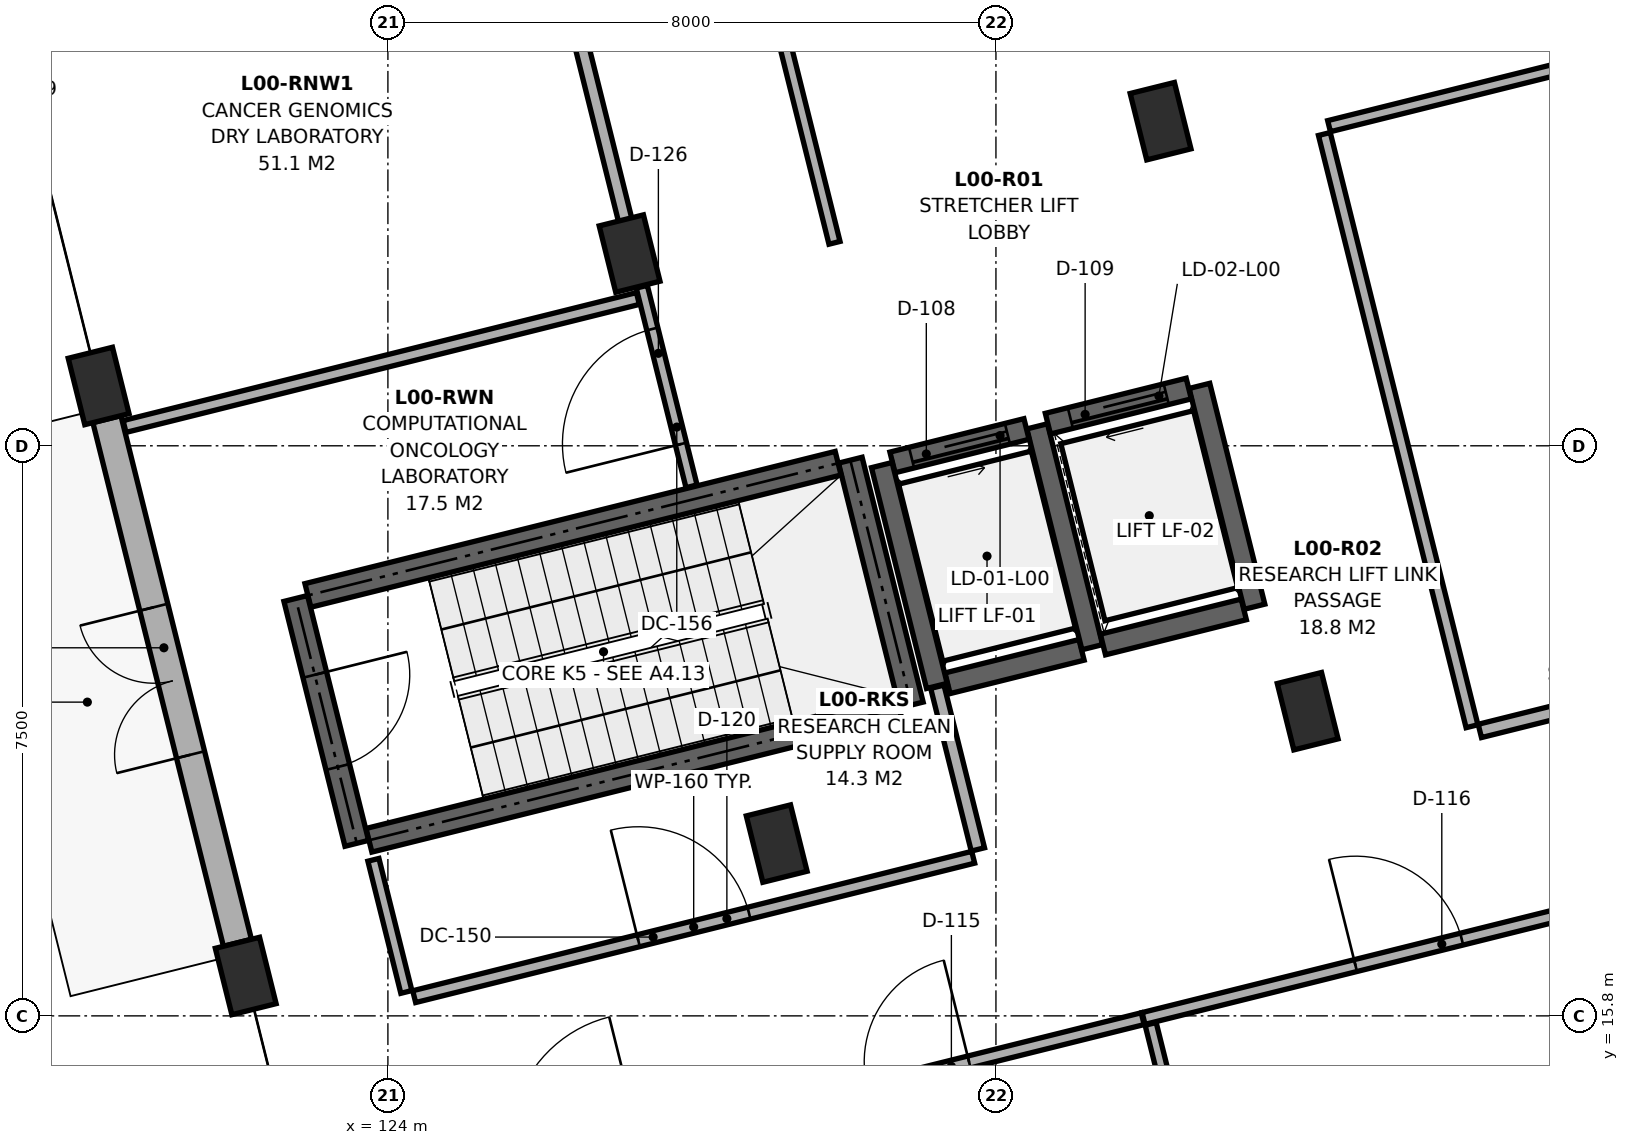
"""IFC4 building model, lengths in metres.
Left out: names, types, materials, properties, quantities, classifications, styles, units other than length and angle.
Written with IfcOpenShell. Run it as: python <this file> out.ifc"""

import sys

from ifc_helpers import new_model, si_unit, direction, frame, frame_2d, origin, origin_2d, place, context, subcontext, project, spatial, rectangle, extrude, element, fill, save


model = new_model("IFC4")
c1 = context("Model", 3, precision=1e-05, world=origin(), true_north=direction((0.0, 1.0)))
c2 = subcontext(c1, "Body", "Model", "MODEL_VIEW")
j1 = project(units=[si_unit("LENGTHUNIT", "METRE"), si_unit("PLANEANGLEUNIT", "RADIAN")], contexts=[c1])
p1 = place(None, origin())
s1 = spatial("IfcSite", under=j1, at=p1, CompositionType="ELEMENT")
p2 = place(p1, origin())
s2 = spatial("IfcBuilding", under=s1, at=p2, CompositionType="ELEMENT")
p3 = place(p2, origin())
s3 = spatial("IfcBuildingStorey", under=s2, at=p3, CompositionType="ELEMENT", Elevation=0.0)
for number, where, z_axis, x_axis in (
    (1, (122.129, 16.325, 0.0), (0.0, 0.0, 1.0), (0.97, 0.242, 0.0)),
    (2, (120.194, 24.087, 0.0), (0.0, 0.0, 1.0), (0.97, 0.242, 0.0)),
    (3, (129.115, 18.067, 0.0), (0.0, 0.0, 1.0), (0.97, 0.242, 0.0)),
    (4, (127.18, 25.829, 0.0), (0.0, 0.0, 1.0), (0.97, 0.242, 0.0)),
    (5, (136.102, 19.808, 0.0), (0.0, 0.0, 1.0), (0.97, 0.242, 0.0)),
    (6, (134.166, 27.571, 0.0), (0.0, 0.0, 1.0), (0.97, 0.242, 0.0)),
):
    element("IfcColumn", number, at=place(p3, frame(where, z_axis=z_axis, x_axis=x_axis)), inside=s3, PredefinedType="COLUMN", context=c2, shape_type="SweptSolid", body=[
        extrude(rectangle(XDim=0.6, YDim=0.9, at=origin_2d()), origin(), (0.0, 0.0, 1.0), 4.7),
    ])
p4 = place(p3, frame((122.02, 16.761, 0.0), z_axis=(0.0, 0.0, 1.0), x_axis=(-0.241912563448, 0.970298052995, 0.0)))
e7 = element("IfcWall", 7, at=p4, inside=s3, PredefinedType="SOLIDWALL", context=c2, shape_type="SweptSolid", body=[
    extrude(rectangle(XDim=7.1, YDim=0.38, at=frame_2d((3.55, 0.0))), origin(), (0.0, 0.0, 1.0), 3.985),
])
p5 = place(p4, frame((2.55, 0.0, 0.0)))
e8 = element("IfcOpeningElement", 8, at=p5, cuts=e7, PredefinedType="OPENING", context=c2, shape_type="SweptSolid", body=[
    extrude(rectangle(XDim=2.0, YDim=2.35, at=frame_2d((1.0, 1.175))), frame((0.0, 0.202, 0.0), z_axis=(0.0, -1.0, 0.0), x_axis=(1.0, 0.0, 0.0)), (0.0, 0.0, 1.0), 0.404),
])
p6 = place(p3, frame((123.75, 18.11, 0.0), z_axis=(0.0, 0.0, 1.0), x_axis=(0.970294108333, 0.241928384724, 0.0)))
e9 = element("IfcWall", 9, at=p6, inside=s3, PredefinedType="SHEAR", context=c2, shape_type="SweptSolid", body=[
    extrude(rectangle(XDim=7.19, YDim=0.32, at=frame_2d((3.595, 0.0))), origin(), (0.0, 0.0, 1.0), 4.7),
])
p7 = place(p3, frame((130.887, 19.889, 0.0), z_axis=(0.0, 0.0, 1.0), x_axis=(-0.241947258837, 0.970289402158, 0.0)))
e10 = element("IfcWall", 10, at=p7, inside=s3, PredefinedType="SHEAR", context=c2, shape_type="SweptSolid", body=[
    extrude(rectangle(XDim=3.32, YDim=0.32, at=frame_2d((1.66, 0.0))), origin(), (0.0, 0.0, 1.0), 4.7),
])
p8 = place(p3, frame((129.924, 23.071, 0.0), z_axis=(0.0, 0.0, 1.0), x_axis=(-0.970294108333, -0.241928384724, 0.0)))
e11 = element("IfcWall", 11, at=p8, inside=s3, PredefinedType="SHEAR", context=c2, shape_type="SweptSolid", body=[
    extrude(rectangle(XDim=7.19, YDim=0.32, at=frame_2d((3.595, 0.0))), origin(), (0.0, 0.0, 1.0), 4.7),
])
p9 = place(p3, frame((122.787, 21.292, 0.0), z_axis=(0.0, 0.0, 1.0), x_axis=(0.241860763027, -0.970310966293, 0.0)))
e12 = element("IfcWall", 12, at=p9, inside=s3, PredefinedType="SHEAR", context=c2, shape_type="SweptSolid", body=[
    extrude(rectangle(XDim=3.32, YDim=0.32, at=frame_2d((1.66, 0.0))), origin(), (0.0, 0.0, 1.0), 4.7),
])
p10 = place(p9, frame((1.035, 0.0, 0.0)))
e13 = element("IfcOpeningElement", 13, at=p10, cuts=e12, PredefinedType="OPENING", context=c2, shape_type="SweptSolid", body=[
    extrude(rectangle(XDim=1.25, YDim=2.2, at=frame_2d((0.625, 1.1))), frame((0.0, 0.172, 0.0), z_axis=(0.0, -1.0, 0.0), x_axis=(1.0, 0.0, 0.0)), (0.0, 0.0, 1.0), 0.344),
])
p11 = place(p3, frame((131.363, 20.176, 0.0), z_axis=(0.0, 0.0, 1.0), x_axis=(0.970284587517, 0.241966566341, 0.0)))
e14 = element("IfcWall", 14, at=p11, inside=s3, PredefinedType="SHEAR", context=c2, shape_type="SweptSolid", body=[
    extrude(rectangle(XDim=1.817, YDim=0.28, at=frame_2d((0.909, 0.0))), origin(), (0.0, 0.0, 1.0), 4.7),
])
p12 = place(p3, frame((133.267, 20.651, 0.0), z_axis=(0.0, 0.0, 1.0), x_axis=(-0.241921647353, 0.970295788171, 0.0)))
e15 = element("IfcWall", 15, at=p12, inside=s3, PredefinedType="SHEAR", context=c2, shape_type="SweptSolid", body=[
    extrude(rectangle(XDim=2.994, YDim=0.28, at=frame_2d((1.497, 0.0))), origin(), (0.0, 0.0, 1.0), 4.7),
])
p13 = place(p3, frame((132.402, 23.521, 0.0), z_axis=(0.0, 0.0, 1.0), x_axis=(-0.970284587517, -0.241966566341, 0.0)))
e16 = element("IfcWall", 16, at=p13, inside=s3, PredefinedType="SHEAR", context=c2, shape_type="SweptSolid", body=[
    extrude(rectangle(XDim=1.817, YDim=0.28, at=frame_2d((0.909, 0.0))), origin(), (0.0, 0.0, 1.0), 4.7),
])
p14 = place(p13, frame((0.259, 0.0, 0.0)))
e17 = element("IfcOpeningElement", 17, at=p14, cuts=e16, PredefinedType="OPENING", context=c2, shape_type="SweptSolid", body=[
    extrude(rectangle(XDim=1.3, YDim=2.2, at=frame_2d((0.65, 1.1))), frame((0.0, 0.152, 0.0), z_axis=(0.0, -1.0, 0.0), x_axis=(1.0, 0.0, 0.0)), (0.0, 0.0, 1.0), 0.304),
])
p15 = place(p3, frame((130.498, 23.046, 0.0), z_axis=(0.0, 0.0, 1.0), x_axis=(0.241921647353, -0.970295788171, 0.0)))
e18 = element("IfcWall", 18, at=p15, inside=s3, PredefinedType="SHEAR", context=c2, shape_type="SweptSolid", body=[
    extrude(rectangle(XDim=2.994, YDim=0.28, at=frame_2d((1.497, 0.0))), origin(), (0.0, 0.0, 1.0), 4.7),
])
p16 = place(p3, frame((133.408, 20.686, 0.0), z_axis=(0.0, 0.0, 1.0), x_axis=(0.970285190026, 0.241964150272, 0.0)))
e19 = element("IfcWall", 19, at=p16, inside=s3, PredefinedType="SHEAR", context=c2, shape_type="SweptSolid", body=[
    extrude(rectangle(XDim=1.91, YDim=0.28, at=frame_2d((0.955, 0.0))), origin(), (0.0, 0.0, 1.0), 4.7),
])
p17 = place(p3, frame((135.402, 21.183, 0.0), z_axis=(0.0, 0.0, 1.0), x_axis=(-0.241921647353, 0.970295788171, 0.0)))
e20 = element("IfcWall", 20, at=p17, inside=s3, PredefinedType="SHEAR", context=c2, shape_type="SweptSolid", body=[
    extrude(rectangle(XDim=2.994, YDim=0.28, at=frame_2d((1.497, 0.0))), origin(), (0.0, 0.0, 1.0), 4.7),
])
p18 = place(p3, frame((134.537, 24.053, 0.0), z_axis=(0.0, 0.0, 1.0), x_axis=(-0.970285190026, -0.241964150272, 0.0)))
e21 = element("IfcWall", 21, at=p18, inside=s3, PredefinedType="SHEAR", context=c2, shape_type="SweptSolid", body=[
    extrude(rectangle(XDim=1.91, YDim=0.28, at=frame_2d((0.955, 0.0))), origin(), (0.0, 0.0, 1.0), 4.7),
])
p19 = place(p18, frame((0.305, 0.0, 0.0)))
e22 = element("IfcOpeningElement", 22, at=p19, cuts=e21, PredefinedType="OPENING", context=c2, shape_type="SweptSolid", body=[
    extrude(rectangle(XDim=1.3, YDim=2.2, at=frame_2d((0.65, 1.1))), frame((0.0, 0.152, 0.0), z_axis=(0.0, -1.0, 0.0), x_axis=(1.0, 0.0, 0.0)), (0.0, 0.0, 1.0), 0.304),
])
p20 = place(p3, frame((124.346, 16.053, 0.0), z_axis=(0.0, 0.0, 1.0), x_axis=(0.970295772287, 0.241921711059, 0.0)))
e23 = element("IfcWall", 23, at=p20, inside=s3, PredefinedType="PARTITIONING", context=c2, shape_type="SweptSolid", body=[
    extrude(rectangle(XDim=7.58, YDim=0.16, at=frame_2d((3.79, 0.0))), origin(), (0.0, 0.0, 1.0), 3.885),
])
p21 = place(p20, frame((3.04, 0.0, 0.0)))
e24 = element("IfcOpeningElement", 24, at=p21, cuts=e23, PredefinedType="OPENING", context=c2, shape_type="SweptSolid", body=[
    extrude(rectangle(XDim=1.5, YDim=2.28, at=frame_2d((0.75, 1.14))), frame((0.0, 0.092, 0.0), z_axis=(0.0, -1.0, 0.0), x_axis=(1.0, 0.0, 0.0)), (0.0, 0.0, 1.0), 0.184),
])
p22 = place(p3, frame((127.995, 22.767, 0.0), z_axis=(0.0, 0.0, 1.0), x_axis=(-0.241877500256, 0.9703067942, 0.0)))
e25 = element("IfcWall", 25, at=p22, inside=s3, PredefinedType="PARTITIONING", context=c2, shape_type="SweptSolid", body=[
    extrude(rectangle(XDim=2.706, YDim=0.15, at=frame_2d((1.353, 0.0))), origin(), (0.0, 0.0, 1.0), 4.7),
])
p23 = place(p22, frame((0.573, 0.0, 0.0)))
e26 = element("IfcOpeningElement", 26, at=p23, cuts=e25, PredefinedType="OPENING", context=c2, shape_type="SweptSolid", body=[
    extrude(rectangle(XDim=1.56, YDim=2.3, at=frame_2d((0.78, 1.15))), frame((0.0, 0.087, 0.0), z_axis=(0.0, -1.0, 0.0), x_axis=(1.0, 0.0, 0.0)), (0.0, 0.0, 1.0), 0.174),
])
p24 = place(p3, frame((128.023, 14.29, 0.0), z_axis=(0.0, 0.0, 1.0), x_axis=(0.970293282145, 0.241931698263, 0.0)))
e27 = element("IfcWall", 27, at=p24, inside=s3, PredefinedType="PARTITIONING", context=c2, shape_type="SweptSolid", body=[
    extrude(rectangle(XDim=6.088, YDim=0.16, at=frame_2d((3.044, 0.0))), origin(), (0.0, 0.0, 1.0), 3.885),
])
p25 = place(p24, frame((2.354, 0.0, 0.0)))
e28 = element("IfcOpeningElement", 28, at=p25, cuts=e27, PredefinedType="OPENING", context=c2, shape_type="SweptSolid", body=[
    extrude(rectangle(XDim=1.38, YDim=2.3, at=frame_2d((0.69, 1.15))), frame((0.0, 0.092, 0.0), z_axis=(0.0, -1.0, 0.0), x_axis=(1.0, 0.0, 0.0)), (0.0, 0.0, 1.0), 0.184),
])
p26 = place(p3, frame((133.942, 15.766, 0.0), z_axis=(0.0, 0.0, 1.0), x_axis=(0.970292162734, 0.241936187739, 0.0)))
e29 = element("IfcWall", 29, at=p26, inside=s3, PredefinedType="PARTITIONING", context=c2, shape_type="SweptSolid", body=[
    extrude(rectangle(XDim=7.188, YDim=0.16, at=frame_2d((3.594, 0.0))), origin(), (0.0, 0.0, 1.0), 3.885),
])
p27 = place(p26, frame((2.874, 0.0, 0.0)))
e30 = element("IfcOpeningElement", 30, at=p27, cuts=e29, PredefinedType="OPENING", context=c2, shape_type="SweptSolid", body=[
    extrude(rectangle(XDim=1.44, YDim=2.32, at=frame_2d((0.72, 1.16))), frame((0.0, 0.092, 0.0), z_axis=(0.0, -1.0, 0.0), x_axis=(1.0, 0.0, 0.0)), (0.0, 0.0, 1.0), 0.184),
])
p28 = place(p3, frame((138.367, 19.549, 0.0), z_axis=(0.0, 0.0, 1.0), x_axis=(0.970295834183, 0.241921462809, 0.0)))
e31 = element("IfcWall", 31, at=p28, inside=s3, PredefinedType="PARTITIONING", context=c2, shape_type="SweptSolid", body=[
    extrude(rectangle(XDim=19.363, YDim=0.18, at=frame_2d((9.682, 0.0))), origin(), (0.0, 0.0, 1.0), 3.885),
])
p29 = place(p28, frame((9.082, 0.0, 0.0)))
e32 = element("IfcOpeningElement", 32, at=p29, cuts=e31, PredefinedType="OPENING", context=c2, shape_type="SweptSolid", body=[
    extrude(rectangle(XDim=1.2, YDim=2.15, at=frame_2d((0.6, 1.075))), frame((0.0, 0.102, 0.0), z_axis=(0.0, -1.0, 0.0), x_axis=(1.0, 0.0, 0.0)), (0.0, 0.0, 1.0), 0.204),
])
p30 = place(p3, frame((127.221, 25.87, 0.0), z_axis=(0.0, 0.0, 1.0), x_axis=(-0.241902639837, 0.970300527074, 0.0)))
e33 = element("IfcWall", 33, at=p30, inside=s3, PredefinedType="PARTITIONING", context=c2, shape_type="SweptSolid", body=[
    extrude(rectangle(XDim=7.533, YDim=0.18, at=frame_2d((3.767, 0.0))), origin(), (0.0, 0.0, 1.0), 3.885),
])
p31 = place(p30, frame((3.267, 0.0, 0.0)))
e34 = element("IfcOpeningElement", 34, at=p31, cuts=e33, PredefinedType="OPENING", context=c2, shape_type="SweptSolid", body=[
    extrude(rectangle(XDim=1.0, YDim=2.22, at=frame_2d((0.5, 1.11))), frame((0.0, 0.102, 0.0), z_axis=(0.0, -1.0, 0.0), x_axis=(1.0, 0.0, 0.0)), (0.0, 0.0, 1.0), 0.204),
])
p32 = place(p3, frame((129.876, 25.97, 0.0), z_axis=(0.0, 0.0, 1.0), x_axis=(-0.241938716353, 0.970291532236, 0.0)))
e35 = element("IfcWall", 35, at=p32, inside=s3, PredefinedType="PARTITIONING", context=c2, shape_type="SweptSolid", body=[
    extrude(rectangle(XDim=7.411, YDim=0.15, at=frame_2d((3.706, 0.0))), origin(), (0.0, 0.0, 1.0), 3.985),
])
p33 = place(p32, frame((3.23, 0.0, 0.0)))
e36 = element("IfcOpeningElement", 36, at=p33, cuts=e35, PredefinedType="OPENING", context=c2, shape_type="SweptSolid", body=[
    extrude(rectangle(XDim=0.95, YDim=2.15, at=frame_2d((0.475, 1.075))), frame((0.0, 0.087, 0.0), z_axis=(0.0, -1.0, 0.0), x_axis=(1.0, 0.0, 0.0)), (0.0, 0.0, 1.0), 0.174),
])
p34 = place(p3, frame((124.243, 16.115, 0.0), z_axis=(0.0, 0.0, 1.0), x_axis=(-0.24202255973, 0.970270622343, 0.0)))
e37 = element("IfcWall", 37, at=p34, inside=s3, PredefinedType="PARTITIONING", context=c2, shape_type="SweptSolid", body=[
    extrude(rectangle(XDim=1.792, YDim=0.15, at=frame_2d((0.896, 0.0))), origin(), (0.0, 0.0, 1.0), 3.985),
])
p35 = place(p3, frame((131.763, 17.99, 0.0), z_axis=(0.0, 0.0, 1.0), x_axis=(-0.241962612769, 0.970285573438, 0.0)))
e38 = element("IfcWall", 38, at=p35, inside=s3, PredefinedType="PARTITIONING", context=c2, shape_type="SweptSolid", body=[
    extrude(rectangle(XDim=2.206, YDim=0.18, at=frame_2d((1.103, 0.0))), origin(), (0.0, 0.0, 1.0), 3.985),
])
p36 = place(p3, frame((120.535, 23.554, 0.0), z_axis=(0.0, 0.0, 1.0), x_axis=(0.970294973208, 0.241924915969, 0.0)))
e39 = element("IfcWall", 39, at=p36, inside=s3, PredefinedType="PARTITIONING", context=c2, shape_type="SweptSolid", body=[
    extrude(rectangle(XDim=6.961, YDim=0.16, at=frame_2d((3.48, 0.0))), origin(), (0.0, 0.0, 1.0), 3.985),
])
p37 = place(p3, frame((135.737, 8.87, 0.0), z_axis=(0.0, 0.0, 1.0), x_axis=(-0.241939357675, 0.970291372325, 0.0)))
e40 = element("IfcWall", 40, at=p37, inside=s3, PredefinedType="PARTITIONING", context=c2, shape_type="SweptSolid", body=[
    extrude(rectangle(XDim=7.033, YDim=0.15, at=frame_2d((3.517, 0.0))), origin(), (0.0, 0.0, 1.0), 3.985),
])
p38 = place(p3, frame((136.383, 27.505, 0.0), z_axis=(0.0, 0.0, 1.0), x_axis=(0.970295884672, 0.241921260307, 0.0)))
e41 = element("IfcWall", 41, at=p38, inside=s3, PredefinedType="PARTITIONING", context=c2, shape_type="SweptSolid", body=[
    extrude(rectangle(XDim=19.263, YDim=0.15, at=frame_2d((9.632, 0.0))), origin(), (0.0, 0.0, 1.0), 3.885),
])
p39 = place(p3, frame((138.264, 19.611, 0.0), z_axis=(0.0, 0.0, 1.0), x_axis=(-0.241920353256, 0.970296110824, 0.0)))
e42 = element("IfcWall", 42, at=p39, inside=s3, PredefinedType="PARTITIONING", context=c2, shape_type="SweptSolid", body=[
    extrude(rectangle(XDim=8.03, YDim=0.16, at=frame_2d((4.015, 0.0))), origin(), (0.0, 0.0, 1.0), 3.985),
])
p40 = place(p5, origin())
e43 = element("IfcDoor", 43, at=p40, inside=s3, OperationType="DOUBLE_DOOR_SINGLE_SWING", PredefinedType="DOOR", context=c2, shape_type="SweptSolid", body=[
    extrude(rectangle(XDim=2.0, YDim=2.35, at=frame_2d((1.0, 1.175))), frame((0.0, 0.025, 0.0), z_axis=(0.0, -1.0, 0.0), x_axis=(1.0, 0.0, 0.0)), (0.0, 0.0, 1.0), 0.05),
])
fill(e8, e43)
p41 = place(p10, origin())
e44 = element("IfcDoor", 44, at=p41, inside=s3, OperationType="SINGLE_SWING_LEFT", PredefinedType="DOOR", context=c2, shape_type="SweptSolid", body=[
    extrude(rectangle(XDim=1.25, YDim=2.2, at=frame_2d((0.625, 1.1))), frame((0.0, 0.025, 0.0), z_axis=(0.0, -1.0, 0.0), x_axis=(1.0, 0.0, 0.0)), (0.0, 0.0, 1.0), 0.05),
])
fill(e13, e44)
p42 = place(p14, origin())
e45 = element("IfcDoor", 45, at=p42, inside=s3, OperationType="SLIDING_TO_LEFT", PredefinedType="DOOR", context=c2, shape_type="SweptSolid", body=[
    extrude(rectangle(XDim=1.3, YDim=2.2, at=frame_2d((0.65, 1.1))), frame((0.0, 0.025, 0.0), z_axis=(0.0, -1.0, 0.0), x_axis=(1.0, 0.0, 0.0)), (0.0, 0.0, 1.0), 0.05),
])
fill(e17, e45)
p43 = place(p19, origin())
e46 = element("IfcDoor", 46, at=p43, inside=s3, OperationType="SLIDING_TO_RIGHT", PredefinedType="DOOR", context=c2, shape_type="SweptSolid", body=[
    extrude(rectangle(XDim=1.3, YDim=2.2, at=frame_2d((0.65, 1.1))), frame((0.0, 0.025, 0.0), z_axis=(0.0, -1.0, 0.0), x_axis=(1.0, 0.0, 0.0)), (0.0, 0.0, 1.0), 0.05),
])
fill(e22, e46)
p44 = place(p21, origin())
e47 = element("IfcDoor", 47, at=p44, inside=s3, OperationType="SINGLE_SWING_LEFT", PredefinedType="DOOR", context=c2, shape_type="SweptSolid", body=[
    extrude(rectangle(XDim=1.5, YDim=2.28, at=frame_2d((0.75, 1.14))), frame((0.0, 0.025, 0.0), z_axis=(0.0, -1.0, 0.0), x_axis=(1.0, 0.0, 0.0)), (0.0, 0.0, 1.0), 0.05),
])
fill(e24, e47)
p45 = place(p23, origin())
e48 = element("IfcDoor", 48, at=p45, inside=s3, OperationType="SINGLE_SWING_LEFT", PredefinedType="DOOR", context=c2, shape_type="SweptSolid", body=[
    extrude(rectangle(XDim=1.56, YDim=2.3, at=frame_2d((0.78, 1.15))), frame((0.0, 0.025, 0.0), z_axis=(0.0, -1.0, 0.0), x_axis=(1.0, 0.0, 0.0)), (0.0, 0.0, 1.0), 0.05),
])
fill(e26, e48)
p46 = place(p25, origin())
e49 = element("IfcDoor", 49, at=p46, inside=s3, OperationType="SINGLE_SWING_RIGHT", PredefinedType="DOOR", context=c2, shape_type="SweptSolid", body=[
    extrude(rectangle(XDim=1.38, YDim=2.3, at=frame_2d((0.69, 1.15))), frame((0.0, 0.025, 0.0), z_axis=(0.0, -1.0, 0.0), x_axis=(1.0, 0.0, 0.0)), (0.0, 0.0, 1.0), 0.05),
])
fill(e28, e49)
p47 = place(p27, origin())
e50 = element("IfcDoor", 50, at=p47, inside=s3, OperationType="SINGLE_SWING_LEFT", PredefinedType="DOOR", context=c2, shape_type="SweptSolid", body=[
    extrude(rectangle(XDim=1.44, YDim=2.32, at=frame_2d((0.72, 1.16))), frame((0.0, 0.025, 0.0), z_axis=(0.0, -1.0, 0.0), x_axis=(1.0, 0.0, 0.0)), (0.0, 0.0, 1.0), 0.05),
])
fill(e30, e50)
save(model, sys.argv[1])
